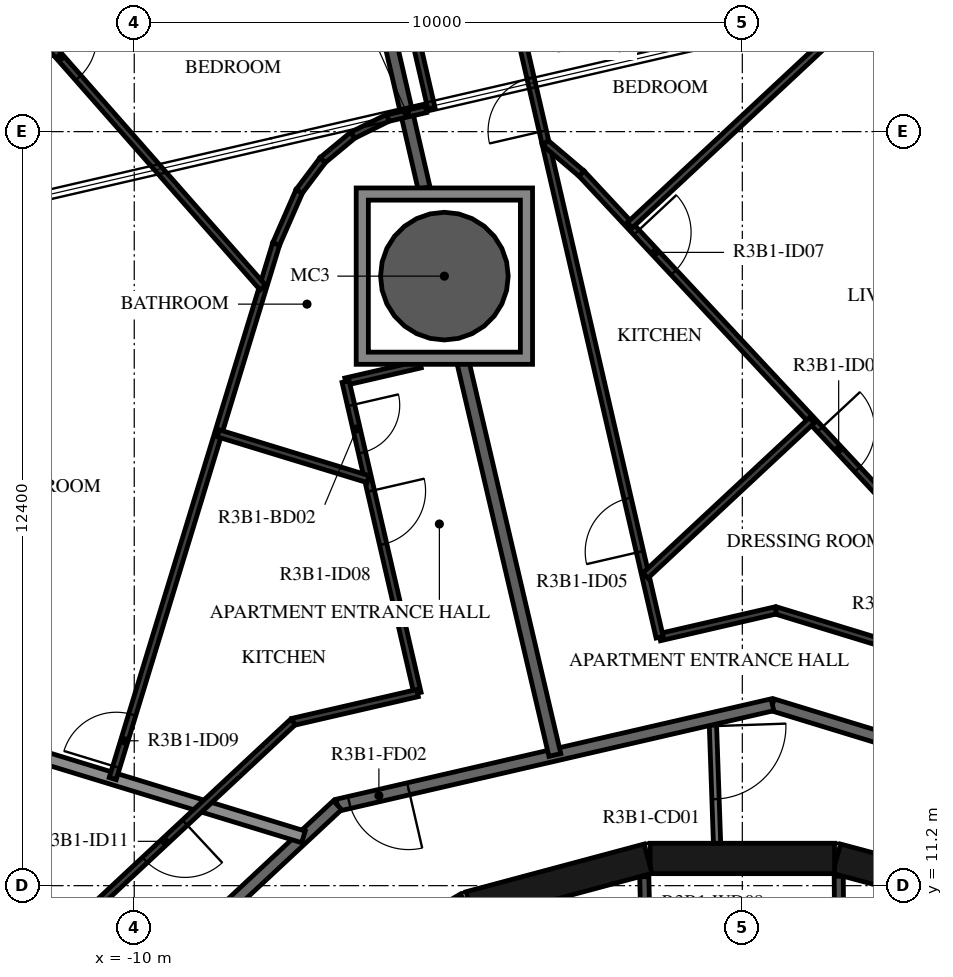
"""IFC4 building model, lengths in metres.
Left out: names, types, materials, properties, quantities, classifications, styles, units other than length and angle.
Written with IfcOpenShell. Run it as: python <this file> out.ifc"""

import sys

from ifc_helpers import new_model, si_unit, direction, frame, frame_2d, origin, origin_2d, place, context, subcontext, project, spatial, polyline, rectangle, hollow_circle, outline, extrude, element, fill, save


model = new_model("IFC4")
c1 = context("Model", 3, precision=1e-05, world=origin(), true_north=direction((0.0, 1.0)))
c2 = subcontext(c1, "Body", "Model", "MODEL_VIEW")
j1 = project(units=[si_unit("LENGTHUNIT", "METRE"), si_unit("PLANEANGLEUNIT", "RADIAN")], contexts=[c1])
p1 = place(None, origin())
s1 = spatial("IfcSite", under=j1, at=p1, CompositionType="ELEMENT")
p2 = place(p1, origin())
s2 = spatial("IfcBuilding", under=s1, at=p2, CompositionType="ELEMENT")
p3 = place(p2, frame((0.0, 0.0, 123.9)))
s3 = spatial("IfcBuildingStorey", under=s2, at=p3, CompositionType="ELEMENT", Elevation=123.9)
p4 = place(p3, frame((-4.9, 21.223, -0.38), z_axis=(0.0, 0.0, 1.0), x_axis=(1.0, 0.0, 0.0)))
e1 = element("IfcColumn", 1, at=p4, inside=s3, PredefinedType="COLUMN", context=c2, shape_type="SweptSolid", body=[
    extrude(hollow_circle(Radius=1.05, WallThickness=0.05, at=origin_2d()), origin(), (0.0, 0.0, 1.0), 3.5),
])
for number, where, z_axis, x_axis in (
    (2, (4.479, 10.858, 0.0), (0.0, 0.0, 1.0), (-0.966, 0.259, 0.0)),
    (3, (1.516, 11.647, 0.0), (0.0, 0.0, 1.0), (-1.0, 0.0, 0.0)),
    (4, (-1.55, 11.643, 0.0), (0.0, 0.0, 1.0), (-0.966, -0.259, 0.0)),
    (5, (-4.51, 10.845, 0.0), (0.0, 0.0, 1.0), (-0.866, -0.5, 0.0)),
):
    element("IfcWall", number, at=place(p3, frame(where, z_axis=z_axis, x_axis=x_axis)), inside=s3, PredefinedType="SHEAR", context=c2, shape_type="SweptSolid", body=[
        extrude(rectangle(XDim=3.033, YDim=0.5, at=frame_2d((1.516, 0.0))), origin(), (0.0, 0.0, 1.0), 3.12),
    ])
p5 = place(p3, frame((1.586, 11.354, 0.0), z_axis=(0.0, 0.0, 1.0), x_axis=(0.007227482881, -0.999973881405, 0.0)))
e6 = element("IfcWall", 6, at=p5, inside=s3, PredefinedType="PARTITIONING", context=c2, shape_type="SweptSolid", body=[
    extrude(rectangle(XDim=2.365, YDim=0.15, at=frame_2d((1.182, 0.0))), origin(), (0.0, 0.0, 1.0), 3.12),
])
p6 = place(p5, frame((0.732, 0.0, 0.0)))
e7 = element("IfcOpeningElement", 7, at=p6, cuts=e6, PredefinedType="OPENING", context=c2, shape_type="SweptSolid", body=[
    extrude(rectangle(XDim=0.9, YDim=2.1, at=frame_2d((0.45, 1.05))), frame((0.0, 0.085, 0.0), z_axis=(0.0, -1.0, 0.0), x_axis=(1.0, 0.0, 0.0)), (0.0, 0.0, 1.0), 0.17),
])
p7 = place(p3, frame((-1.555, 8.99, 0.0), z_axis=(0.0, 0.0, 1.0), x_axis=(-0.024125549686, 0.999708936567, 0.0)))
e8 = element("IfcWall", 8, at=p7, inside=s3, PredefinedType="PARTITIONING", context=c2, shape_type="SweptSolid", body=[
    extrude(rectangle(XDim=2.358, YDim=0.15, at=frame_2d((1.179, 0.0))), origin(), (0.0, 0.0, 1.0), 3.12),
])
p8 = place(p7, frame((0.729, 0.0, 0.0)))
e9 = element("IfcOpeningElement", 9, at=p8, cuts=e8, PredefinedType="OPENING", context=c2, shape_type="SweptSolid", body=[
    extrude(rectangle(XDim=0.9, YDim=2.1, at=frame_2d((0.45, 1.05))), frame((0.0, 0.085, 0.0), z_axis=(0.0, -1.0, 0.0), x_axis=(1.0, 0.0, 0.0)), (0.0, 0.0, 1.0), 0.17),
])
p9 = place(p3, frame((-0.487, 13.948, 0.0), z_axis=(0.0, 0.0, 1.0), x_axis=(0.034859752231, -0.999392214135, 0.0)))
e10 = element("IfcWall", 10, at=p9, inside=s3, PredefinedType="PARTITIONING", context=c2, shape_type="SweptSolid", body=[
    extrude(rectangle(XDim=2.052, YDim=0.12, at=frame_2d((1.026, 0.0))), origin(), (0.0, 0.0, 1.0), 3.12),
])
p10 = place(p9, frame((0.125, 0.0, 0.0)))
e11 = element("IfcOpeningElement", 11, at=p10, cuts=e10, PredefinedType="OPENING", context=c2, shape_type="SweptSolid", body=[
    extrude(rectangle(XDim=1.2, YDim=2.1, at=frame_2d((0.6, 1.05))), frame((0.0, 0.07, 0.0), z_axis=(0.0, -1.0, 0.0), x_axis=(1.0, 0.0, 0.0)), (0.0, 0.0, 1.0), 0.14),
])
p11 = place(p3, frame((7.516, 12.028, 0.0), z_axis=(0.0, 0.0, 1.0), x_axis=(-0.956306642771, 0.292365533182, 0.0)))
e12 = element("IfcWall", 12, at=p11, inside=s3, PredefinedType="STANDARD", context=c2, shape_type="SweptSolid", body=[
    extrude(rectangle(XDim=7.342, YDim=0.2, at=frame_2d((3.671, 0.0))), origin(), (0.0, 0.0, 1.0), 3.12),
])
p12 = place(p3, frame((0.495, 14.175, 0.0), z_axis=(0.0, 0.0, 1.0), x_axis=(-0.974376622151, -0.224922649383, 0.0)))
e13 = element("IfcWall", 13, at=p12, inside=s3, PredefinedType="STANDARD", context=c2, shape_type="SweptSolid", body=[
    extrude(rectangle(XDim=7.342, YDim=0.2, at=frame_2d((3.671, 0.0))), origin(), (0.0, 0.0, 1.0), 3.12),
])
p13 = place(p12, frame((6.142, 0.0, 0.0)))
e14 = element("IfcOpeningElement", 14, at=p13, cuts=e13, PredefinedType="OPENING", context=c2, shape_type="SweptSolid", body=[
    extrude(rectangle(XDim=1.0, YDim=2.1, at=frame_2d((0.5, 1.05))), frame((0.0, 0.11, 0.0), z_axis=(0.0, -1.0, 0.0), x_axis=(1.0, 0.0, 0.0)), (0.0, 0.0, 1.0), 0.22),
])
p14 = place(p3, frame((-6.659, 12.523, 0.0), z_axis=(0.0, 0.0, 1.0), x_axis=(-0.731350455479, -0.682001841105, 0.0)))
e15 = element("IfcWall", 15, at=p14, inside=s3, PredefinedType="STANDARD", context=c2, shape_type="SweptSolid", body=[
    extrude(rectangle(XDim=7.342, YDim=0.2, at=frame_2d((3.671, 0.0))), origin(), (0.0, 0.0, 1.0), 3.12),
])
p15 = place(p14, frame((4.264, 0.0, 0.0)))
e16 = element("IfcOpeningElement", 16, at=p15, cuts=e15, PredefinedType="OPENING", context=c2, shape_type="SweptSolid", body=[
    extrude(rectangle(XDim=1.0, YDim=2.1, at=frame_2d((0.5, 1.05))), frame((0.0, 0.11, 0.0), z_axis=(0.0, -1.0, 0.0), x_axis=(1.0, 0.0, 0.0)), (0.0, 0.0, 1.0), 0.22),
])
p16 = place(p3, frame((-4.602, 19.839, 0.0), z_axis=(0.0, 0.0, 1.0), x_axis=(0.227891855607, -0.973686449607, 0.0)))
e17 = element("IfcWall", 17, at=p16, inside=s3, PredefinedType="STANDARD", context=c2, shape_type="SweptSolid", body=[
    extrude(rectangle(XDim=6.666, YDim=0.2, at=frame_2d((3.333, 0.0))), origin(), (0.0, 0.0, 1.0), 3.12),
])
p17 = place(p3, frame((-6.687, 28.966, 0.0), z_axis=(0.0, 0.0, 1.0), x_axis=(0.224945100086, -0.974371439415, 0.0)))
e18 = element("IfcWall", 18, at=p17, inside=s3, PredefinedType="STANDARD", context=c2, shape_type="SweptSolid", body=[
    extrude(rectangle(XDim=6.458, YDim=0.2, at=frame_2d((3.229, 0.0))), origin(), (0.0, 0.0, 1.0), 3.12),
])
p18 = place(p3, frame((-15.327, 14.481, 0.0), z_axis=(0.0, 0.0, 1.0), x_axis=(0.956303504869, -0.292375796837, 0.0)))
e19 = element("IfcWall", 19, at=p18, inside=s3, PredefinedType="STANDARD", context=c2, shape_type="SweptSolid", body=[
    extrude(rectangle(XDim=8.48, YDim=0.2, at=frame_2d((4.24, 0.0))), origin(), (0.0, 0.0, 1.0), 2.73),
])
p19 = place(p3, frame((5.453, 14.228, 0.0), z_axis=(0.0, 0.0, 1.0), x_axis=(-0.95630868333, 0.292358858576, 0.0)))
e20 = element("IfcWall", 20, at=p19, inside=s3, PredefinedType="PARTITIONING", context=c2, shape_type="SweptSolid", body=[
    extrude(rectangle(XDim=5.127, YDim=0.12, at=frame_2d((2.564, 0.0))), origin(), (0.0, 0.0, 1.0), 3.12),
])
p20 = place(p19, frame((1.5, 0.0, 0.0)))
e21 = element("IfcOpeningElement", 21, at=p20, cuts=e20, PredefinedType="OPENING", context=c2, shape_type="SweptSolid", body=[
    extrude(rectangle(XDim=0.9, YDim=2.1, at=frame_2d((0.45, 1.05))), frame((0.0, 0.07, 0.0), z_axis=(0.0, -1.0, 0.0), x_axis=(1.0, 0.0, 0.0)), (0.0, 0.0, 1.0), 0.14),
])
p21 = place(p3, frame((0.549, 15.727, 0.0), z_axis=(0.0, 0.0, 1.0), x_axis=(-0.974374390785, -0.22493231556, 0.0)))
e22 = element("IfcWall", 22, at=p21, inside=s3, PredefinedType="PARTITIONING", context=c2, shape_type="SweptSolid", body=[
    extrude(rectangle(XDim=1.959, YDim=0.12, at=frame_2d((0.979, 0.0))), origin(), (0.0, 0.0, 1.0), 3.12),
])
p22 = place(p3, frame((-1.36, 15.286, 0.0), z_axis=(0.0, 0.0, 1.0), x_axis=(-0.224974943676, 0.97436454919, 0.0)))
e23 = element("IfcWall", 23, at=p22, inside=s3, PredefinedType="PARTITIONING", context=c2, shape_type="SweptSolid", body=[
    extrude(rectangle(XDim=8.341, YDim=0.12, at=frame_2d((4.17, 0.0))), origin(), (0.0, 0.0, 1.0), 3.12),
])
p23 = place(p22, frame((1.441, 0.0, 0.0)))
e24 = element("IfcOpeningElement", 24, at=p23, cuts=e23, PredefinedType="OPENING", context=c2, shape_type="SweptSolid", body=[
    extrude(rectangle(XDim=0.9, YDim=2.1, at=frame_2d((0.45, 1.05))), frame((0.0, 0.07, 0.0), z_axis=(0.0, -1.0, 0.0), x_axis=(1.0, 0.0, 0.0)), (0.0, 0.0, 1.0), 0.14),
])
p24 = place(p3, frame((-3.236, 23.413, 0.0), z_axis=(0.0, 0.0, 1.0), x_axis=(-0.224934720918, 0.97437383551, 0.0)))
e25 = element("IfcWall", 25, at=p24, inside=s3, PredefinedType="PARTITIONING", context=c2, shape_type="SweptSolid", body=[
    extrude(rectangle(XDim=4.03, YDim=0.12, at=frame_2d((2.015, 0.0))), origin(), (0.0, 0.0, 1.0), 3.12),
])
p25 = place(p24, frame((0.2, 0.0, 0.0)))
e26 = element("IfcOpeningElement", 26, at=p25, cuts=e25, PredefinedType="OPENING", context=c2, shape_type="SweptSolid", body=[
    extrude(rectangle(XDim=0.9, YDim=2.1, at=frame_2d((0.45, 1.05))), frame((0.0, 0.07, 0.0), z_axis=(0.0, -1.0, 0.0), x_axis=(1.0, 0.0, 0.0)), (0.0, 0.0, 1.0), 0.14),
])
p26 = place(p3, frame((-5.799, 26.957, 0.0), z_axis=(0.0, 0.0, 1.0), x_axis=(0.224876960008, -0.974387167843, 0.0)))
e27 = element("IfcWall", 27, at=p26, inside=s3, PredefinedType="PARTITIONING", context=c2, shape_type="SweptSolid", body=[
    extrude(rectangle(XDim=3.065, YDim=0.12, at=frame_2d((1.532, 0.0))), origin(), (0.0, 0.0, 1.0), 3.12),
])
p27 = place(p3, frame((-5.205, 23.971, 0.0), z_axis=(0.0, 0.0, 1.0), x_axis=(-0.974410422398, -0.224776174722, 0.0)))
e28 = element("IfcWall", 28, at=p27, inside=s3, PredefinedType="PARTITIONING", context=c2, shape_type="SweptSolid", body=[
    extrude(rectangle(XDim=0.642, YDim=0.12, at=frame_2d((0.321, 0.0))), origin(), (0.0, 0.0, 1.0), 3.12),
])
p28 = place(p3, frame((-2.646, 22.912, 0.0), z_axis=(0.0, 0.0, 1.0), x_axis=(0.68200318122, -0.731349205788, 0.0)))
e29 = element("IfcWall", 29, at=p28, inside=s3, PredefinedType="PARTITIONING", context=c2, shape_type="SweptSolid", body=[
    extrude(rectangle(XDim=11.874, YDim=0.12, at=frame_2d((5.937, 0.0))), origin(), (0.0, 0.0, 1.0), 3.12),
])
p29 = place(p28, frame((5.752, 0.0, 0.0)))
e30 = element("IfcOpeningElement", 30, at=p29, cuts=e29, PredefinedType="OPENING", context=c2, shape_type="SweptSolid", body=[
    extrude(rectangle(XDim=0.9, YDim=2.1, at=frame_2d((0.45, 1.05))), frame((0.0, 0.07, 0.0), z_axis=(0.0, -1.0, 0.0), x_axis=(1.0, 0.0, 0.0)), (0.0, 0.0, 1.0), 0.14),
])
p30 = place(p28, frame((1.324, 0.0, 0.0)))
e31 = element("IfcOpeningElement", 31, at=p30, cuts=e29, PredefinedType="OPENING", context=c2, shape_type="SweptSolid", body=[
    extrude(rectangle(XDim=0.9, YDim=2.1, at=frame_2d((0.45, 1.05))), frame((0.0, 0.07, 0.0), z_axis=(0.0, -1.0, 0.0), x_axis=(1.0, 0.0, 0.0)), (0.0, 0.0, 1.0), 0.14),
])
p31 = place(p3, frame((1.951, 25.607, 0.0), z_axis=(0.0, 0.0, 1.0), x_axis=(-0.73134872518, -0.682003696601, 0.0)))
e32 = element("IfcWall", 32, at=p31, inside=s3, PredefinedType="PARTITIONING", context=c2, shape_type="SweptSolid", body=[
    extrude(rectangle(XDim=5.2, YDim=0.12, at=frame_2d((2.6, 0.0))), origin(), (0.0, 0.0, 1.0), 2.73),
])
p32 = place(p3, frame((1.141, 18.851, 0.0), z_axis=(0.0, 0.0, 1.0), x_axis=(-0.731352611136, -0.68199952946, 0.0)))
e33 = element("IfcWall", 33, at=p32, inside=s3, PredefinedType="PARTITIONING", context=c2, shape_type="SweptSolid", body=[
    extrude(rectangle(XDim=3.74, YDim=0.12, at=frame_2d((1.87, 0.0))), origin(), (0.0, 0.0, 1.0), 3.12),
])
p33 = place(p3, frame((-3.236, 23.413, 0.0), z_axis=(0.0, 0.0, 1.0), x_axis=(0.762429029489, -0.647071846855, 0.0)))
e34 = element("IfcWall", 34, at=p33, inside=s3, PredefinedType="PARTITIONING", context=c2, shape_type="SweptSolid", body=[
    extrude(rectangle(XDim=0.775, YDim=0.12, at=frame_2d((0.387, 0.0))), origin(), (0.0, 0.0, 1.0), 3.12),
])
p34 = place(p3, frame((-5.293, 19.773, 0.0), z_axis=(0.0, 0.0, 1.0), x_axis=(-0.974391195695, -0.224859506699, 0.0)))
e35 = element("IfcWall", 35, at=p34, inside=s3, PredefinedType="PARTITIONING", context=c2, shape_type="SweptSolid", body=[
    extrude(rectangle(XDim=1.264, YDim=0.12, at=frame_2d((0.632, 0.0))), origin(), (0.0, 0.0, 1.0), 3.12),
])
p35 = place(p3, frame((-6.524, 19.489, 0.0), z_axis=(0.0, 0.0, 1.0), x_axis=(0.22494768659, -0.974370842286, 0.0)))
e36 = element("IfcWall", 36, at=p35, inside=s3, PredefinedType="PARTITIONING", context=c2, shape_type="SweptSolid", body=[
    extrude(rectangle(XDim=5.257, YDim=0.12, at=frame_2d((2.629, 0.0))), origin(), (0.0, 0.0, 1.0), 3.12),
])
p36 = place(p35, frame((0.4, 0.0, 0.0)))
e37 = element("IfcOpeningElement", 37, at=p36, cuts=e36, PredefinedType="OPENING", context=c2, shape_type="SweptSolid", body=[
    extrude(rectangle(XDim=0.8, YDim=2.1, at=frame_2d((0.4, 1.05))), frame((0.0, 0.07, 0.0), z_axis=(0.0, -1.0, 0.0), x_axis=(1.0, 0.0, 0.0)), (0.0, 0.0, 1.0), 0.14),
])
p37 = place(p35, frame((1.846, 0.0, 0.0)))
e38 = element("IfcOpeningElement", 38, at=p37, cuts=e36, PredefinedType="OPENING", context=c2, shape_type="SweptSolid", body=[
    extrude(rectangle(XDim=0.9, YDim=2.1, at=frame_2d((0.45, 1.05))), frame((0.0, 0.07, 0.0), z_axis=(0.0, -1.0, 0.0), x_axis=(1.0, 0.0, 0.0)), (0.0, 0.0, 1.0), 0.14),
])
p38 = place(p3, frame((-5.342, 14.367, 0.0), z_axis=(0.0, 0.0, 1.0), x_axis=(-0.974367677287, -0.224961395484, 0.0)))
e39 = element("IfcWall", 39, at=p38, inside=s3, PredefinedType="PARTITIONING", context=c2, shape_type="SweptSolid", body=[
    extrude(rectangle(XDim=2.1, YDim=0.12, at=frame_2d((1.05, 0.0))), origin(), (0.0, 0.0, 1.0), 3.12),
])
p39 = place(p3, frame((-7.388, 13.894, 0.0), z_axis=(0.0, 0.0, 1.0), x_axis=(-0.731357186721, -0.681994622729, 0.0)))
e40 = element("IfcWall", 40, at=p39, inside=s3, PredefinedType="PARTITIONING", context=c2, shape_type="SweptSolid", body=[
    extrude(rectangle(XDim=8.146, YDim=0.12, at=frame_2d((4.073, 0.0))), origin(), (0.0, 0.0, 1.0), 3.12),
])
p40 = place(p39, frame((2.432, 0.0, 0.0)))
e41 = element("IfcOpeningElement", 41, at=p40, cuts=e40, PredefinedType="OPENING", context=c2, shape_type="SweptSolid", body=[
    extrude(rectangle(XDim=0.9, YDim=2.1, at=frame_2d((0.45, 1.05))), frame((0.0, 0.07, 0.0), z_axis=(0.0, -1.0, 0.0), x_axis=(1.0, 0.0, 0.0)), (0.0, 0.0, 1.0), 0.14),
])
p41 = place(p39, frame((7.046, 0.0, 0.0)))
e42 = element("IfcOpeningElement", 42, at=p41, cuts=e40, PredefinedType="OPENING", context=c2, shape_type="SweptSolid", body=[
    extrude(rectangle(XDim=0.9, YDim=2.1, at=frame_2d((0.45, 1.05))), frame((0.0, 0.07, 0.0), z_axis=(0.0, -1.0, 0.0), x_axis=(1.0, 0.0, 0.0)), (0.0, 0.0, 1.0), 0.14),
])
p42 = place(p3, frame((-10.354, 12.961, 0.0), z_axis=(0.0, 0.0, 1.0), x_axis=(0.292379778045, 0.956302287663, 0.0)))
e43 = element("IfcWall", 43, at=p42, inside=s3, PredefinedType="PARTITIONING", context=c2, shape_type="SweptSolid", body=[
    extrude(rectangle(XDim=9.194, YDim=0.12, at=frame_2d((4.597, 0.0))), origin(), (0.0, 0.0, 1.0), 3.12),
])
p43 = place(p42, frame((0.2, 0.0, 0.0)))
e44 = element("IfcOpeningElement", 44, at=p43, cuts=e43, PredefinedType="OPENING", context=c2, shape_type="SweptSolid", body=[
    extrude(rectangle(XDim=0.9, YDim=2.1, at=frame_2d((0.45, 1.05))), frame((0.0, 0.07, 0.0), z_axis=(0.0, -1.0, 0.0), x_axis=(1.0, 0.0, 0.0)), (0.0, 0.0, 1.0), 0.14),
])
p44 = place(p3, frame((-7.666, 21.753, 0.0), z_axis=(0.0, 0.0, 1.0), x_axis=(0.401562829944, 0.915831476642, 0.0)))
e45 = element("IfcWall", 45, at=p44, inside=s3, PredefinedType="PARTITIONING", context=c2, shape_type="SweptSolid", body=[
    extrude(rectangle(XDim=0.947, YDim=0.12, at=frame_2d((0.473, 0.0))), origin(), (0.0, 0.0, 1.0), 3.12),
])
p45 = place(p3, frame((-7.286, 22.62, 0.0), z_axis=(0.0, 0.0, 1.0), x_axis=(0.601702575527, 0.798720233, 0.0)))
e46 = element("IfcWall", 46, at=p45, inside=s3, PredefinedType="PARTITIONING", context=c2, shape_type="SweptSolid", body=[
    extrude(rectangle(XDim=0.642, YDim=0.12, at=frame_2d((0.321, 0.0))), origin(), (0.0, 0.0, 1.0), 3.12),
])
p46 = place(p3, frame((-6.9, 23.132, 0.0), z_axis=(0.0, 0.0, 1.0), x_axis=(0.769653132962, 0.638462258025, 0.0)))
e47 = element("IfcWall", 47, at=p46, inside=s3, PredefinedType="PARTITIONING", context=c2, shape_type="SweptSolid", body=[
    extrude(rectangle(XDim=0.642, YDim=0.12, at=frame_2d((0.321, 0.0))), origin(), (0.0, 0.0, 1.0), 3.12),
])
p47 = place(p3, frame((-6.406, 23.542, 0.0), z_axis=(0.0, 0.0, 1.0), x_axis=(0.896245703043, 0.44355793283, 0.0)))
e48 = element("IfcWall", 48, at=p47, inside=s3, PredefinedType="PARTITIONING", context=c2, shape_type="SweptSolid", body=[
    extrude(rectangle(XDim=0.642, YDim=0.12, at=frame_2d((0.321, 0.0))), origin(), (0.0, 0.0, 1.0), 3.12),
])
p48 = place(p3, frame((-11.713, 25.385, 0.0), z_axis=(0.0, 0.0, 1.0), x_axis=(0.660694383024, -0.750655002142, 0.0)))
e49 = element("IfcWall", 49, at=p48, inside=s3, PredefinedType="PARTITIONING", context=c2, shape_type="SweptSolid", body=[
    extrude(rectangle(XDim=5.794, YDim=0.12, at=frame_2d((2.897, 0.0))), origin(), (0.0, 0.0, 1.0), 3.12),
])
p49 = place(p48, frame((0.3, 0.0, 0.0)))
e50 = element("IfcOpeningElement", 50, at=p49, cuts=e49, PredefinedType="OPENING", context=c2, shape_type="SweptSolid", body=[
    extrude(rectangle(XDim=0.9, YDim=2.1, at=frame_2d((0.45, 1.05))), frame((0.0, 0.07, 0.0), z_axis=(0.0, -1.0, 0.0), x_axis=(1.0, 0.0, 0.0)), (0.0, 0.0, 1.0), 0.14),
])
p50 = place(p3, frame((-8.618, 18.639, 0.0), z_axis=(0.0, 0.0, 1.0), x_axis=(0.956305961168, -0.292367762647, 0.0)))
e51 = element("IfcWall", 51, at=p50, inside=s3, PredefinedType="PARTITIONING", context=c2, shape_type="SweptSolid", body=[
    extrude(rectangle(XDim=2.577, YDim=0.12, at=frame_2d((1.289, 0.0))), origin(), (0.0, 0.0, 1.0), 3.12),
])
p51 = place(p3, origin())
e52 = element("IfcWall", 52, at=p51, inside=s3, PredefinedType="STANDARD", context=c2, shape_type="SweptSolid", body=[
    extrude(outline(polyline([(-3.45, 22.674), (-3.45, 19.773), (-6.35, 19.773), (-6.35, 22.674), (-3.45, 22.674)]), holes=[polyline([(-6.15, 19.973), (-3.65, 19.973), (-3.65, 22.473), (-6.15, 22.473), (-6.15, 19.973)])]), origin(), (0.0, 0.0, 1.0), 3.12),
])
p52 = place(p25, origin())
e53 = element("IfcDoor", 53, at=p52, inside=s3, OperationType="SINGLE_SWING_LEFT", PredefinedType="DOOR", context=c2, shape_type="SweptSolid", body=[
    extrude(rectangle(XDim=0.9, YDim=2.1, at=frame_2d((0.45, 1.05))), frame((0.0, 0.025, 0.0), z_axis=(0.0, -1.0, 0.0), x_axis=(1.0, 0.0, 0.0)), (0.0, 0.0, 1.0), 0.05),
])
fill(e26, e53)
p53 = place(p23, origin())
e54 = element("IfcDoor", 54, at=p53, inside=s3, OperationType="SINGLE_SWING_RIGHT", PredefinedType="DOOR", context=c2, shape_type="SweptSolid", body=[
    extrude(rectangle(XDim=0.9, YDim=2.1, at=frame_2d((0.45, 1.05))), frame((0.0, 0.025, 0.0), z_axis=(0.0, -1.0, 0.0), x_axis=(1.0, 0.0, 0.0)), (0.0, 0.0, 1.0), 0.05),
])
fill(e24, e54)
p54 = place(p29, origin())
e55 = element("IfcDoor", 55, at=p54, inside=s3, OperationType="SINGLE_SWING_RIGHT", PredefinedType="DOOR", context=c2, shape_type="SweptSolid", body=[
    extrude(rectangle(XDim=0.9, YDim=2.1, at=frame_2d((0.45, 1.05))), frame((0.0, 0.025, 0.0), z_axis=(0.0, -1.0, 0.0), x_axis=(1.0, 0.0, 0.0)), (0.0, 0.0, 1.0), 0.05),
])
fill(e30, e55)
p55 = place(p30, origin())
e56 = element("IfcDoor", 56, at=p55, inside=s3, OperationType="SINGLE_SWING_LEFT", PredefinedType="DOOR", context=c2, shape_type="SweptSolid", body=[
    extrude(rectangle(XDim=0.9, YDim=2.1, at=frame_2d((0.45, 1.05))), frame((0.0, 0.025, 0.0), z_axis=(0.0, -1.0, 0.0), x_axis=(1.0, 0.0, 0.0)), (0.0, 0.0, 1.0), 0.05),
])
fill(e31, e56)
p56 = place(p13, origin())
e57 = element("IfcDoor", 57, at=p56, inside=s3, OperationType="SINGLE_SWING_LEFT", PredefinedType="DOOR", context=c2, shape_type="SweptSolid", body=[
    extrude(rectangle(XDim=1.0, YDim=2.1, at=frame_2d((0.5, 1.05))), frame((0.0, 0.025, 0.0), z_axis=(0.0, -1.0, 0.0), x_axis=(1.0, 0.0, 0.0)), (0.0, 0.0, 1.0), 0.05),
])
fill(e14, e57)
p57 = place(p36, origin())
e58 = element("IfcDoor", 58, at=p57, inside=s3, OperationType="SINGLE_SWING_LEFT", PredefinedType="DOOR", context=c2, shape_type="SweptSolid", body=[
    extrude(rectangle(XDim=0.8, YDim=2.1, at=frame_2d((0.4, 1.05))), frame((0.0, 0.025, 0.0), z_axis=(0.0, -1.0, 0.0), x_axis=(1.0, 0.0, 0.0)), (0.0, 0.0, 1.0), 0.05),
])
fill(e37, e58)
p58 = place(p37, origin())
e59 = element("IfcDoor", 59, at=p58, inside=s3, OperationType="SINGLE_SWING_LEFT", PredefinedType="DOOR", context=c2, shape_type="SweptSolid", body=[
    extrude(rectangle(XDim=0.9, YDim=2.1, at=frame_2d((0.45, 1.05))), frame((0.0, 0.025, 0.0), z_axis=(0.0, -1.0, 0.0), x_axis=(1.0, 0.0, 0.0)), (0.0, 0.0, 1.0), 0.05),
])
fill(e38, e59)
p59 = place(p43, origin())
e60 = element("IfcDoor", 60, at=p59, inside=s3, OperationType="SINGLE_SWING_LEFT", PredefinedType="DOOR", context=c2, shape_type="SweptSolid", body=[
    extrude(rectangle(XDim=0.9, YDim=2.1, at=frame_2d((0.45, 1.05))), frame((0.0, 0.025, 0.0), z_axis=(0.0, -1.0, 0.0), x_axis=(1.0, 0.0, 0.0)), (0.0, 0.0, 1.0), 0.05),
])
fill(e44, e60)
p60 = place(p49, origin())
e61 = element("IfcDoor", 61, at=p60, inside=s3, OperationType="SINGLE_SWING_LEFT", PredefinedType="DOOR", context=c2, shape_type="SweptSolid", body=[
    extrude(rectangle(XDim=0.9, YDim=2.1, at=frame_2d((0.45, 1.05))), frame((0.0, 0.025, 0.0), z_axis=(0.0, -1.0, 0.0), x_axis=(1.0, 0.0, 0.0)), (0.0, 0.0, 1.0), 0.05),
])
fill(e50, e61)
p61 = place(p40, origin())
e62 = element("IfcDoor", 62, at=p61, inside=s3, OperationType="SINGLE_SWING_LEFT", PredefinedType="DOOR", context=c2, shape_type="SweptSolid", body=[
    extrude(rectangle(XDim=0.9, YDim=2.1, at=frame_2d((0.45, 1.05))), frame((0.0, 0.025, 0.0), z_axis=(0.0, -1.0, 0.0), x_axis=(1.0, 0.0, 0.0)), (0.0, 0.0, 1.0), 0.05),
])
fill(e41, e62)
p62 = place(p10, origin())
e63 = element("IfcDoor", 63, at=p62, inside=s3, OperationType="DOUBLE_DOOR_SINGLE_SWING", PredefinedType="DOOR", context=c2, shape_type="SweptSolid", body=[
    extrude(rectangle(XDim=1.2, YDim=2.1, at=frame_2d((0.6, 1.05))), frame((0.0, 0.025, 0.0), z_axis=(0.0, -1.0, 0.0), x_axis=(1.0, 0.0, 0.0)), (0.0, 0.0, 1.0), 0.05),
])
fill(e11, e63)
save(model, sys.argv[1])
